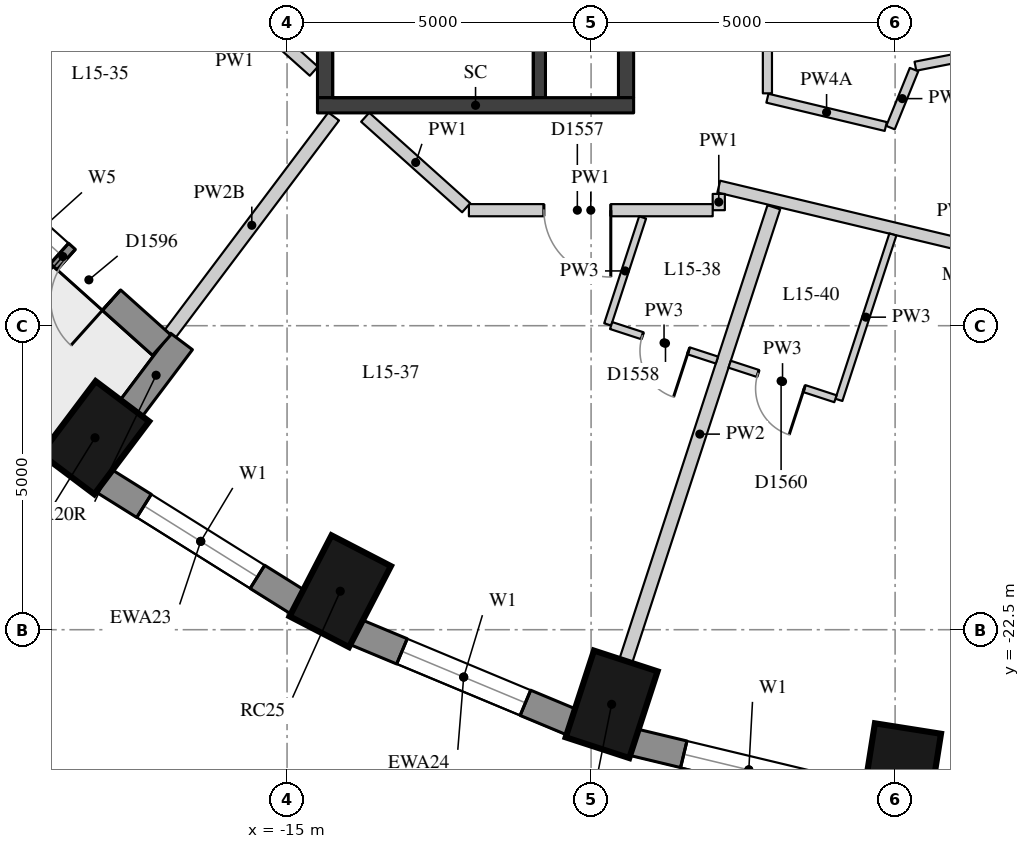
"""IFC4 building model, lengths in metres.
Left out: names, types, materials, properties, quantities, classifications, styles, units other than length and angle.
Written with IfcOpenShell. Run it as: python <this file> out.ifc"""

import sys

from ifc_helpers import new_model, si_unit, direction, frame, frame_2d, origin, origin_2d, place, context, subcontext, project, spatial, rectangle, extrude, element, fill, save


model = new_model("IFC4")
c1 = context("Model", 3, precision=1e-05, world=origin(), true_north=direction((0.0, 1.0)))
c2 = subcontext(c1, "Body", "Model", "MODEL_VIEW")
j1 = project(units=[si_unit("LENGTHUNIT", "METRE"), si_unit("PLANEANGLEUNIT", "RADIAN")], contexts=[c1])
p1 = place(None, origin())
s1 = spatial("IfcSite", under=j1, at=p1, CompositionType="ELEMENT")
p2 = place(p1, origin())
s2 = spatial("IfcBuilding", under=s1, at=p2, CompositionType="ELEMENT")
p3 = place(p2, frame((0.0, 0.0, 58.0)))
s3 = spatial("IfcBuildingStorey", under=s2, at=p3, CompositionType="ELEMENT", Elevation=58.0)
for number, where, z_axis, x_axis in (
    (1, (-18.159, -19.343, 0.0), (0.0, 0.0, 1.0), (-0.601, -0.799, 0.0)),
    (2, (-14.125, -21.867, 0.0), (0.0, 0.0, 1.0), (-0.46, -0.888, 0.0)),
    (3, (-9.662, -23.727, 0.0), (0.0, 0.0, 1.0), (-0.31, -0.951, 0.0)),
    (4, (-4.906, -24.866, 0.0), (0.0, 0.0, 1.0), (-0.156, -0.988, 0.0)),
):
    element("IfcColumn", number, at=place(p3, frame(where, z_axis=z_axis, x_axis=x_axis)), inside=s3, PredefinedType="COLUMN", context=c2, shape_type="SweptSolid", body=[
        extrude(rectangle(XDim=1.5, YDim=1.1, at=origin_2d()), origin(), (0.0, 0.0, 1.0), 3.3),
    ])
p4 = place(p3, frame((-18.023, -20.044, 0.0), z_axis=(0.0, 0.0, 1.0), x_axis=(0.847635480093, -0.530579016629, 0.0)))
e5 = element("IfcWall", 5, at=p4, inside=s3, PredefinedType="SOLIDWALL", context=c2, shape_type="SweptSolid", body=[
    extrude(rectangle(XDim=3.782, YDim=0.45, at=frame_2d((1.891, 0.0))), origin(), (0.0, 0.0, 1.0), 3.02),
])
p5 = place(p4, frame((0.791, 0.0, 0.4)))
e6 = element("IfcOpeningElement", 6, at=p5, cuts=e5, PredefinedType="OPENING", context=c2, shape_type="SweptSolid", body=[
    extrude(rectangle(XDim=2.2, YDim=1.75, at=frame_2d((1.1, 0.875))), frame((0.0, 0.235, 0.0), z_axis=(0.0, -1.0, 0.0), x_axis=(1.0, 0.0, 0.0)), (0.0, 0.0, 1.0), 0.47),
])
p6 = place(p3, frame((-13.875, -22.537, 0.0), z_axis=(0.0, 0.0, 1.0), x_axis=(0.923031964282, -0.384723267966, 0.0)))
e7 = element("IfcWall", 7, at=p6, inside=s3, PredefinedType="SOLIDWALL", context=c2, shape_type="SweptSolid", body=[
    extrude(rectangle(XDim=3.856, YDim=0.45, at=frame_2d((1.928, 0.0))), origin(), (0.0, 0.0, 1.0), 3.02),
])
p7 = place(p6, frame((0.828, 0.0, 0.4)))
e8 = element("IfcOpeningElement", 8, at=p7, cuts=e7, PredefinedType="OPENING", context=c2, shape_type="SweptSolid", body=[
    extrude(rectangle(XDim=2.2, YDim=1.75, at=frame_2d((1.1, 0.875))), frame((0.0, 0.235, 0.0), z_axis=(0.0, -1.0, 0.0), x_axis=(1.0, 0.0, 0.0)), (0.0, 0.0, 1.0), 0.47),
])
p8 = place(p3, frame((-9.308, -24.35, 0.0), z_axis=(0.0, 0.0, 1.0), x_axis=(0.972496561493, -0.232917233979, 0.0)))
e9 = element("IfcWall", 9, at=p8, inside=s3, PredefinedType="SOLIDWALL", context=c2, shape_type="SweptSolid", body=[
    extrude(rectangle(XDim=3.911, YDim=0.45, at=frame_2d((1.956, 0.0))), origin(), (0.0, 0.0, 1.0), 3.02),
])
p9 = place(p8, frame((0.855, 0.0, 0.4)))
e10 = element("IfcOpeningElement", 10, at=p9, cuts=e9, PredefinedType="OPENING", context=c2, shape_type="SweptSolid", body=[
    extrude(rectangle(XDim=2.2, YDim=1.75, at=frame_2d((1.1, 0.875))), frame((0.0, 0.235, 0.0), z_axis=(0.0, -1.0, 0.0), x_axis=(1.0, 0.0, 0.0)), (0.0, 0.0, 1.0), 0.47),
])
p10 = place(p3, frame((-17.572, -18.871, 0.0), z_axis=(0.0, 0.0, 1.0), x_axis=(0.601262851241, 0.799051302306, 0.0)))
e11 = element("IfcWall", 11, at=p10, inside=s3, PredefinedType="SOLIDWALL", context=c2, shape_type="SweptSolid", body=[
    extrude(rectangle(XDim=1.391, YDim=0.45, at=frame_2d((0.696, 0.0))), origin(), (0.0, 0.0, 1.0), 2.57),
])
p11 = place(p3, frame((-20.313, -14.905, 0.0), z_axis=(0.0, 0.0, 1.0), x_axis=(0.744616407434, -0.667492626012, 0.0)))
e12 = element("IfcWall", 12, at=p11, inside=s3, PredefinedType="SOLIDWALL", context=c2, shape_type="SweptSolid", body=[
    extrude(rectangle(XDim=4.365, YDim=0.45, at=frame_2d((2.183, 0.0))), origin(), (0.0, 0.0, 1.0), 3.02),
])
p12 = place(p11, frame((1.108, 0.0, 0.4)))
e13 = element("IfcOpeningElement", 13, at=p12, cuts=e12, PredefinedType="OPENING", context=c2, shape_type="SweptSolid", body=[
    extrude(rectangle(XDim=1.0, YDim=1.75, at=frame_2d((0.5, 0.875))), frame((0.0, 0.235, 0.0), z_axis=(0.0, -1.0, 0.0), x_axis=(1.0, 0.0, 0.0)), (0.0, 0.0, 1.0), 0.47),
])
p13 = place(p11, frame((2.258, 0.0, 0.0)))
e14 = element("IfcOpeningElement", 14, at=p13, cuts=e12, PredefinedType="OPENING", context=c2, shape_type="SweptSolid", body=[
    extrude(rectangle(XDim=1.0, YDim=2.15, at=frame_2d((0.5, 1.075))), frame((0.0, 0.235, 0.0), z_axis=(0.0, -1.0, 0.0), x_axis=(1.0, 0.0, 0.0)), (0.0, 0.0, 1.0), 0.47),
])
p14 = place(p3, frame((-10.85, -13.75, 0.0), z_axis=(0.0, 0.0, 1.0), x_axis=(0.0, 1.0, 0.0)))
e15 = element("IfcWall", 15, at=p14, inside=s3, PredefinedType="SHEAR", context=c2, shape_type="SweptSolid", body=[
    extrude(rectangle(XDim=6.0, YDim=0.2, at=frame_2d((3.0, 0.0))), origin(), (0.0, 0.0, 1.0), 3.02),
])
p15 = place(p14, frame((4.4, 0.0, 0.0)))
e16 = element("IfcOpeningElement", 16, at=p15, cuts=e15, PredefinedType="OPENING", context=c2, shape_type="SweptSolid", body=[
    extrude(rectangle(XDim=1.5, YDim=2.1, at=frame_2d((0.75, 1.05))), frame((0.0, 0.11, 0.0), z_axis=(0.0, -1.0, 0.0), x_axis=(1.0, 0.0, 0.0)), (0.0, 0.0, 1.0), 0.22),
])
p16 = place(p3, frame((-14.375, -13.75, -0.28), z_axis=(0.0, 0.0, 1.0), x_axis=(0.0, 1.0, 0.0)))
e17 = element("IfcWall", 17, at=p16, inside=s3, PredefinedType="SHEAR", context=c2, shape_type="SweptSolid", body=[
    extrude(rectangle(XDim=6.0, YDim=0.25, at=frame_2d((3.0, 0.0))), origin(), (0.0, 0.0, 1.0), 3.3),
])
p17 = place(p3, frame((-9.425, -13.75, -0.28), z_axis=(0.0, 0.0, 1.0), x_axis=(0.0, 1.0, 0.0)))
e18 = element("IfcWall", 18, at=p17, inside=s3, PredefinedType="SHEAR", context=c2, shape_type="SweptSolid", body=[
    extrude(rectangle(XDim=6.0, YDim=0.25, at=frame_2d((3.0, 0.0))), origin(), (0.0, 0.0, 1.0), 3.3),
])
p18 = place(p17, frame((2.4, 0.0, 0.28)))
e19 = element("IfcOpeningElement", 19, at=p18, cuts=e18, PredefinedType="OPENING", context=c2, shape_type="SweptSolid", body=[
    extrude(rectangle(XDim=1.5, YDim=2.1, at=frame_2d((0.75, 1.05))), frame((0.0, 0.135, 0.0), z_axis=(0.0, -1.0, 0.0), x_axis=(1.0, 0.0, 0.0)), (0.0, 0.0, 1.0), 0.27),
])
p19 = place(p3, frame((-14.5, -13.875, -0.28), z_axis=(0.0, 0.0, 1.0), x_axis=(1.0, 0.0, 0.0)))
e20 = element("IfcWall", 20, at=p19, inside=s3, PredefinedType="SHEAR", context=c2, shape_type="SweptSolid", body=[
    extrude(rectangle(XDim=5.2, YDim=0.25, at=frame_2d((2.6, 0.0))), origin(), (0.0, 0.0, 1.0), 3.3),
])
p20 = place(p3, frame((-14.559, -13.314, 0.0), z_axis=(0.0, 0.0, 1.0), x_axis=(-0.744636171002, 0.667470578254, 0.0)))
e21 = element("IfcWall", 21, at=p20, inside=s3, PredefinedType="PARTITIONING", context=c2, shape_type="SweptSolid", body=[
    extrude(rectangle(XDim=2.069, YDim=0.2, at=frame_2d((1.035, 0.0))), origin(), (0.0, 0.0, 1.0), 3.02),
])
p21 = place(p3, frame((-0.098, -17.077, 0.0), z_axis=(0.0, 0.0, 1.0), x_axis=(-0.972607318404, 0.232454305588, 0.0)))
e22 = element("IfcWall", 22, at=p21, inside=s3, PredefinedType="PARTITIONING", context=c2, shape_type="SweptSolid", body=[
    extrude(rectangle(XDim=8.022, YDim=0.2, at=frame_2d((4.011, 0.0))), origin(), (0.0, 0.0, 1.0), 3.02),
])
p22 = place(p21, frame((1.479, 0.0, 0.0)))
e23 = element("IfcOpeningElement", 23, at=p22, cuts=e22, PredefinedType="OPENING", context=c2, shape_type="SweptSolid", body=[
    extrude(rectangle(XDim=1.1, YDim=2.1, at=frame_2d((0.55, 1.05))), frame((0.0, 0.11, 0.0), z_axis=(0.0, -1.0, 0.0), x_axis=(1.0, 0.0, 0.0)), (0.0, 0.0, 1.0), 0.22),
])
p23 = place(p3, frame((-7.9, -15.332, 0.0), z_axis=(0.0, 0.0, 1.0), x_axis=(0.0, -1.0, 0.0)))
e24 = element("IfcWall", 24, at=p23, inside=s3, PredefinedType="PARTITIONING", context=c2, shape_type="SweptSolid", body=[
    extrude(rectangle(XDim=0.268, YDim=0.2, at=frame_2d((0.134, 0.0))), origin(), (0.0, 0.0, 1.0), 3.02),
])
p24 = place(p3, frame((-8.0, -15.6, 0.0), z_axis=(0.0, 0.0, 1.0), x_axis=(-1.0, 0.0, 0.0)))
e25 = element("IfcWall", 25, at=p24, inside=s3, PredefinedType="PARTITIONING", context=c2, shape_type="SweptSolid", body=[
    extrude(rectangle(XDim=4.009, YDim=0.2, at=frame_2d((2.005, 0.0))), origin(), (0.0, 0.0, 1.0), 3.02),
])
p25 = place(p24, frame((1.676, 0.0, 0.0)))
e26 = element("IfcOpeningElement", 26, at=p25, cuts=e25, PredefinedType="OPENING", context=c2, shape_type="SweptSolid", body=[
    extrude(rectangle(XDim=1.1, YDim=2.1, at=frame_2d((0.55, 1.05))), frame((0.0, 0.11, 0.0), z_axis=(0.0, -1.0, 0.0), x_axis=(1.0, 0.0, 0.0)), (0.0, 0.0, 1.0), 0.22),
])
p26 = place(p3, frame((-12.054, -15.56, 0.0), z_axis=(0.0, 0.0, 1.0), x_axis=(-0.744625700487, 0.66748225907, 0.0)))
e27 = element("IfcWall", 27, at=p26, inside=s3, PredefinedType="PARTITIONING", context=c2, shape_type="SweptSolid", body=[
    extrude(rectangle(XDim=2.231, YDim=0.2, at=frame_2d((1.116, 0.0))), origin(), (0.0, 0.0, 1.0), 3.02),
])
p27 = place(p3, frame((-2.615, -12.83, 0.0), z_axis=(0.0, 0.0, 1.0), x_axis=(-0.981297312652, -0.192498270593, 0.0)))
e28 = element("IfcWall", 28, at=p27, inside=s3, PredefinedType="PARTITIONING", context=c2, shape_type="SweptSolid", body=[
    extrude(rectangle(XDim=2.09, YDim=0.15, at=frame_2d((1.045, 0.0))), origin(), (0.0, 0.0, 1.0), 3.02),
])
p28 = place(p3, frame((-4.688, -13.288, 0.0), z_axis=(0.0, 0.0, 1.0), x_axis=(-0.375963709287, -0.926634388148, 0.0)))
e29 = element("IfcWall", 29, at=p28, inside=s3, PredefinedType="PARTITIONING", context=c2, shape_type="SweptSolid", body=[
    extrude(rectangle(XDim=1.03, YDim=0.15, at=frame_2d((0.515, 0.0))), origin(), (0.0, 0.0, 1.0), 3.02),
])
p29 = place(p3, frame((-5.154, -14.224, 0.0), z_axis=(0.0, 0.0, 1.0), x_axis=(-0.97258848944, 0.232533073366, 0.0)))
e30 = element("IfcWall", 30, at=p29, inside=s3, PredefinedType="PARTITIONING", context=c2, shape_type="SweptSolid", body=[
    extrude(rectangle(XDim=2.001, YDim=0.15, at=frame_2d((1.0, 0.0))), origin(), (0.0, 0.0, 1.0), 2.57),
])
p30 = place(p3, frame((-7.1, -13.678, 0.0), z_axis=(0.0, 0.0, 1.0), x_axis=(0.0, 1.0, 0.0)))
e31 = element("IfcWall", 31, at=p30, inside=s3, PredefinedType="PARTITIONING", context=c2, shape_type="SweptSolid", body=[
    extrude(rectangle(XDim=1.928, YDim=0.15, at=frame_2d((0.964, 0.0))), origin(), (0.0, 0.0, 1.0), 3.02),
])
p31 = place(p3, frame((-16.927, -17.638, 0.0), z_axis=(0.0, 0.0, 1.0), x_axis=(0.601158965663, 0.799129462605, 0.0)))
e32 = element("IfcWall", 32, at=p31, inside=s3, PredefinedType="PARTITIONING", context=c2, shape_type="SweptSolid", body=[
    extrude(rectangle(XDim=4.48, YDim=0.22, at=frame_2d((2.24, 0.0))), origin(), (0.0, 0.0, 1.0), 2.57),
])
p32 = place(p3, frame((-9.429, -23.014, 0.0), z_axis=(0.0, 0.0, 1.0), x_axis=(0.310249775859, 0.950655077607, 0.0)))
e33 = element("IfcWall", 33, at=p32, inside=s3, PredefinedType="PARTITIONING", context=c2, shape_type="SweptSolid", body=[
    extrude(rectangle(XDim=7.85, YDim=0.22, at=frame_2d((3.925, 0.0))), origin(), (0.0, 0.0, 1.0), 3.02),
])
p33 = place(p3, frame((-9.153, -15.719, 0.0), z_axis=(0.0, 0.0, 1.0), x_axis=(-0.310326382186, -0.950630073435, 0.0)))
e34 = element("IfcWall", 34, at=p33, inside=s3, PredefinedType="PARTITIONING", context=c2, shape_type="SweptSolid", body=[
    extrude(rectangle(XDim=1.851, YDim=0.12, at=frame_2d((0.926, 0.0))), origin(), (0.0, 0.0, 1.0), 3.02),
])
p34 = place(p3, frame((-5.037, -15.999, 0.0), z_axis=(0.0, 0.0, 1.0), x_axis=(-0.310181518973, -0.950677350781, 0.0)))
e35 = element("IfcWall", 35, at=p34, inside=s3, PredefinedType="PARTITIONING", context=c2, shape_type="SweptSolid", body=[
    extrude(rectangle(XDim=2.862, YDim=0.12, at=frame_2d((1.431, 0.0))), origin(), (0.0, 0.0, 1.0), 3.02),
])
p35 = place(p3, frame((-9.67, -17.498, 0.0), z_axis=(0.0, 0.0, 1.0), x_axis=(0.950678536911, -0.31017788357, 0.0)))
e36 = element("IfcWall", 36, at=p35, inside=s3, PredefinedType="PARTITIONING", context=c2, shape_type="SweptSolid", body=[
    extrude(rectangle(XDim=1.83, YDim=0.12, at=frame_2d((0.915, 0.0))), origin(), (0.0, 0.0, 1.0), 3.02),
])
p36 = place(p35, frame((0.54, 0.0, 0.0)))
e37 = element("IfcOpeningElement", 37, at=p36, cuts=e36, PredefinedType="OPENING", context=c2, shape_type="SweptSolid", body=[
    extrude(rectangle(XDim=0.8, YDim=2.1, at=frame_2d((0.4, 1.05))), frame((0.0, 0.07, 0.0), z_axis=(0.0, -1.0, 0.0), x_axis=(1.0, 0.0, 0.0)), (0.0, 0.0, 1.0), 0.14),
])
p37 = place(p3, frame((-5.981, -18.701, 0.0), z_axis=(0.0, 0.0, 1.0), x_axis=(-0.950639191072, 0.310298450524, 0.0)))
e38 = element("IfcWall", 38, at=p37, inside=s3, PredefinedType="PARTITIONING", context=c2, shape_type="SweptSolid", body=[
    extrude(rectangle(XDim=1.83, YDim=0.12, at=frame_2d((0.915, 0.0))), origin(), (0.0, 0.0, 1.0), 3.02),
])
p38 = place(p37, frame((0.54, 0.0, 0.0)))
e39 = element("IfcOpeningElement", 39, at=p38, cuts=e38, PredefinedType="OPENING", context=c2, shape_type="SweptSolid", body=[
    extrude(rectangle(XDim=0.8, YDim=2.1, at=frame_2d((0.4, 1.05))), frame((0.0, 0.07, 0.0), z_axis=(0.0, -1.0, 0.0), x_axis=(1.0, 0.0, 0.0)), (0.0, 0.0, 1.0), 0.14),
])
p39 = place(p5, origin())
e40 = element("IfcWindow", 40, at=p39, inside=s3, PartitioningType="SINGLE_PANEL", PredefinedType="WINDOW", context=c2, shape_type="SweptSolid", body=[
    extrude(rectangle(XDim=2.2, YDim=1.75, at=frame_2d((1.1, 0.875))), frame((0.0, 0.035, 0.0), z_axis=(0.0, -1.0, 0.0), x_axis=(1.0, 0.0, 0.0)), (0.0, 0.0, 1.0), 0.06),
])
fill(e6, e40)
p40 = place(p7, origin())
e41 = element("IfcWindow", 41, at=p40, inside=s3, PartitioningType="SINGLE_PANEL", PredefinedType="WINDOW", context=c2, shape_type="SweptSolid", body=[
    extrude(rectangle(XDim=2.2, YDim=1.75, at=frame_2d((1.1, 0.875))), frame((0.0, 0.035, 0.0), z_axis=(0.0, -1.0, 0.0), x_axis=(1.0, 0.0, 0.0)), (0.0, 0.0, 1.0), 0.06),
])
fill(e8, e41)
p41 = place(p9, origin())
e42 = element("IfcWindow", 42, at=p41, inside=s3, PartitioningType="SINGLE_PANEL", PredefinedType="WINDOW", context=c2, shape_type="SweptSolid", body=[
    extrude(rectangle(XDim=2.2, YDim=1.75, at=frame_2d((1.1, 0.875))), frame((0.0, 0.035, 0.0), z_axis=(0.0, -1.0, 0.0), x_axis=(1.0, 0.0, 0.0)), (0.0, 0.0, 1.0), 0.06),
])
fill(e10, e42)
p42 = place(p12, origin())
e43 = element("IfcWindow", 43, at=p42, inside=s3, PartitioningType="SINGLE_PANEL", PredefinedType="WINDOW", context=c2, shape_type="SweptSolid", body=[
    extrude(rectangle(XDim=1.0, YDim=1.75, at=frame_2d((0.5, 0.875))), frame((0.0, 0.035, 0.0), z_axis=(0.0, -1.0, 0.0), x_axis=(1.0, 0.0, 0.0)), (0.0, 0.0, 1.0), 0.06),
])
fill(e13, e43)
p43 = place(p13, frame((1.0, 0.0, 0.0), z_axis=(0.0, 0.0, 1.0), x_axis=(-1.0, 0.0, 0.0)))
e44 = element("IfcDoor", 44, at=p43, inside=s3, OperationType="SINGLE_SWING_LEFT", PredefinedType="DOOR", context=c2, shape_type="SweptSolid", body=[
    extrude(rectangle(XDim=1.0, YDim=2.15, at=frame_2d((0.5, 1.075))), frame((0.0, 0.075, 0.0), z_axis=(0.0, -1.0, 0.0), x_axis=(1.0, 0.0, 0.0)), (0.0, 0.0, 1.0), 0.05),
])
fill(e14, e44)
p44 = place(p25, origin())
e45 = element("IfcDoor", 45, at=p44, inside=s3, OperationType="SINGLE_SWING_LEFT", PredefinedType="DOOR", context=c2, shape_type="SweptSolid", body=[
    extrude(rectangle(XDim=1.1, YDim=2.1, at=frame_2d((0.55, 1.05))), frame((0.0, 0.025, 0.0), z_axis=(0.0, -1.0, 0.0), x_axis=(1.0, 0.0, 0.0)), (0.0, 0.0, 1.0), 0.05),
])
fill(e26, e45)
p45 = place(p36, origin())
e46 = element("IfcDoor", 46, at=p45, inside=s3, OperationType="SINGLE_SWING_LEFT", PredefinedType="DOOR", context=c2, shape_type="SweptSolid", body=[
    extrude(rectangle(XDim=0.8, YDim=2.1, at=frame_2d((0.4, 1.05))), frame((0.0, 0.025, 0.0), z_axis=(0.0, -1.0, 0.0), x_axis=(1.0, 0.0, 0.0)), (0.0, 0.0, 1.0), 0.05),
])
fill(e37, e46)
p46 = place(p38, origin())
e47 = element("IfcDoor", 47, at=p46, inside=s3, OperationType="SINGLE_SWING_LEFT", PredefinedType="DOOR", context=c2, shape_type="SweptSolid", body=[
    extrude(rectangle(XDim=0.8, YDim=2.1, at=frame_2d((0.4, 1.05))), frame((0.0, 0.025, 0.0), z_axis=(0.0, -1.0, 0.0), x_axis=(1.0, 0.0, 0.0)), (0.0, 0.0, 1.0), 0.05),
])
fill(e39, e47)
save(model, sys.argv[1])
